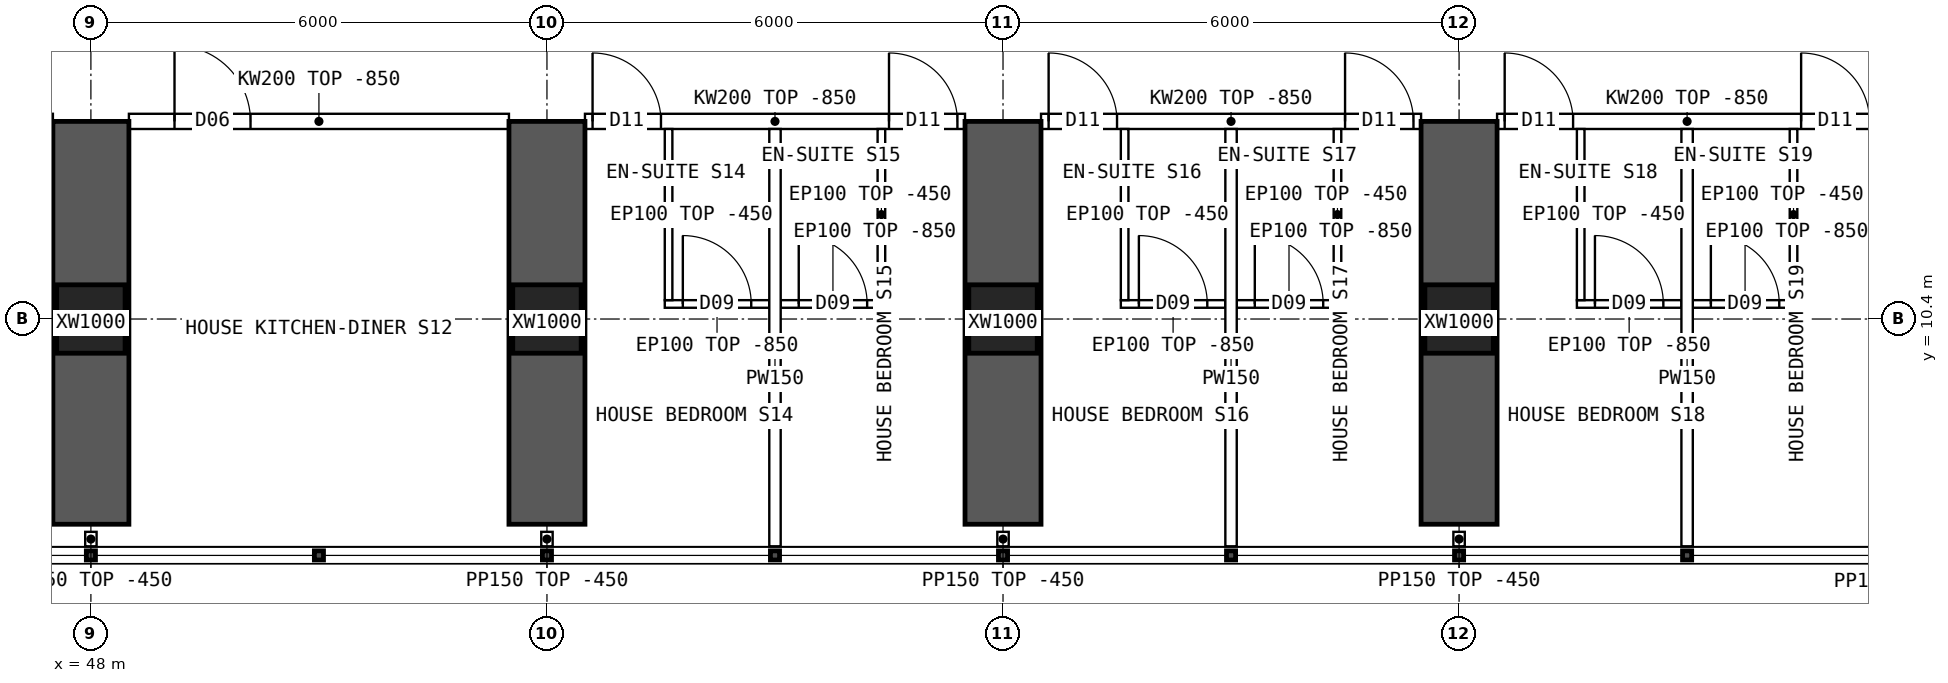
"""IFC4 building model, lengths in metres.
Left out: names, types, materials, properties, quantities, classifications, styles, units other than length and angle.
Written with IfcOpenShell. Run it as: python <this file> out.ifc"""

import sys

from ifc_helpers import new_model, si_unit, direction, frame, frame_2d, origin, origin_2d, place, context, subcontext, project, spatial, polyline, rectangle, hollow_rectangle, outline, extrude, element, fill, save


model = new_model("IFC4")
c1 = context("Model", 3, precision=1e-05, world=origin(), true_north=direction((0.0, 1.0)))
c2 = subcontext(c1, "Body", "Model", "MODEL_VIEW")
j1 = project(units=[si_unit("LENGTHUNIT", "METRE"), si_unit("PLANEANGLEUNIT", "RADIAN")], contexts=[c1])
p1 = place(None, origin())
s1 = spatial("IfcSite", under=j1, at=p1, CompositionType="ELEMENT")
p2 = place(p1, origin())
s2 = spatial("IfcBuilding", under=s1, at=p2, CompositionType="ELEMENT")
p3 = place(p2, frame((0.0, 0.0, 35.2)))
s3 = spatial("IfcBuildingStorey", under=s2, at=p3, CompositionType="ELEMENT", Elevation=35.2)
for number, where, z_axis, x_axis in (
    (1, (48.0, 10.4, 0.0), (0.0, 0.0, 1.0), (1.0, 0.0, 0.0)),
    (2, (54.0, 10.4, 0.0), (0.0, 0.0, 1.0), (1.0, 0.0, 0.0)),
    (3, (60.0, 10.4, 0.0), (0.0, 0.0, 1.0), (1.0, 0.0, 0.0)),
    (4, (66.0, 10.4, 0.0), (0.0, 0.0, 1.0), (1.0, 0.0, 0.0)),
):
    element("IfcColumn", number, at=place(p3, frame(where, z_axis=z_axis, x_axis=x_axis)), inside=s3, PredefinedType="COLUMN", context=c2, shape_type="SweptSolid", body=[
        extrude(hollow_rectangle(XDim=0.9, YDim=0.9, WallThickness=0.09, at=origin_2d()), origin(), (0.0, 0.0, 1.0), 3.75),
    ])
for number, where, z_axis, x_axis in (
    (5, (48.0, 7.7, 0.0), (0.0, 0.0, 1.0), (0.0, 1.0, 0.0)),
    (6, (54.0, 7.7, 0.0), (0.0, 0.0, 1.0), (0.0, 1.0, 0.0)),
    (7, (60.0, 7.7, 0.0), (0.0, 0.0, 1.0), (0.0, 1.0, 0.0)),
    (8, (66.0, 7.7, 0.0), (0.0, 0.0, 1.0), (0.0, 1.0, 0.0)),
):
    element("IfcWall", number, at=place(p3, frame(where, z_axis=z_axis, x_axis=x_axis)), inside=s3, PredefinedType="SHEAR", context=c2, shape_type="SweptSolid", body=[
        extrude(rectangle(XDim=5.3, YDim=1.0, at=frame_2d((2.65, 0.0))), origin(), (0.0, 0.0, 1.0), 3.75),
    ])
p4 = place(p3, frame((48.5, 13.0, 0.0), z_axis=(0.0, 0.0, 1.0), x_axis=(1.0, 0.0, 0.0)))
e9 = element("IfcWall", 9, at=p4, inside=s3, PredefinedType="SOLIDWALL", context=c2, shape_type="SweptSolid", body=[
    extrude(outline(polyline([(0.0, 0.0), (5.0, 0.0), (5.0, 2.9), (0.0, 2.9), (0.0, 0.0)])), frame((0.0, 0.1, 0.0), z_axis=(0.0, -1.0, 0.0), x_axis=(1.0, 0.0, 0.0)), (0.0, 0.0, 1.0), 0.2),
])
p5 = place(p4, frame((0.6, 0.0, 0.0)))
e10 = element("IfcOpeningElement", 10, at=p5, cuts=e9, PredefinedType="OPENING", context=c2, shape_type="SweptSolid", body=[
    extrude(rectangle(XDim=1.0, YDim=2.1, at=frame_2d((0.5, 1.05))), frame((0.0, 0.11, 0.0), z_axis=(0.0, -1.0, 0.0), x_axis=(1.0, 0.0, 0.0)), (0.0, 0.0, 1.0), 0.22),
])
p6 = place(p3, frame((54.5, 13.0, 0.0), z_axis=(0.0, 0.0, 1.0), x_axis=(1.0, 0.0, 0.0)))
e11 = element("IfcWall", 11, at=p6, inside=s3, PredefinedType="SOLIDWALL", context=c2, shape_type="SweptSolid", body=[
    extrude(outline(polyline([(0.0, 0.0), (5.0, 0.0), (5.0, 2.9), (0.0, 2.9), (0.0, 0.0)])), frame((0.0, 0.1, 0.0), z_axis=(0.0, -1.0, 0.0), x_axis=(1.0, 0.0, 0.0)), (0.0, 0.0, 1.0), 0.2),
])
p7 = place(p6, frame((0.1, 0.0, 0.0)))
e12 = element("IfcOpeningElement", 12, at=p7, cuts=e11, PredefinedType="OPENING", context=c2, shape_type="SweptSolid", body=[
    extrude(rectangle(XDim=0.9, YDim=2.1, at=frame_2d((0.45, 1.05))), frame((0.0, 0.11, 0.0), z_axis=(0.0, -1.0, 0.0), x_axis=(1.0, 0.0, 0.0)), (0.0, 0.0, 1.0), 0.22),
])
p8 = place(p6, frame((4.0, 0.0, 0.0)))
e13 = element("IfcOpeningElement", 13, at=p8, cuts=e11, PredefinedType="OPENING", context=c2, shape_type="SweptSolid", body=[
    extrude(rectangle(XDim=0.9, YDim=2.1, at=frame_2d((0.45, 1.05))), frame((0.0, 0.11, 0.0), z_axis=(0.0, -1.0, 0.0), x_axis=(1.0, 0.0, 0.0)), (0.0, 0.0, 1.0), 0.22),
])
p9 = place(p3, frame((60.5, 13.0, 0.0), z_axis=(0.0, 0.0, 1.0), x_axis=(1.0, 0.0, 0.0)))
e14 = element("IfcWall", 14, at=p9, inside=s3, PredefinedType="SOLIDWALL", context=c2, shape_type="SweptSolid", body=[
    extrude(outline(polyline([(0.0, 0.0), (5.0, 0.0), (5.0, 2.9), (0.0, 2.9), (0.0, 0.0)])), frame((0.0, 0.1, 0.0), z_axis=(0.0, -1.0, 0.0), x_axis=(1.0, 0.0, 0.0)), (0.0, 0.0, 1.0), 0.2),
])
p10 = place(p9, frame((0.1, 0.0, 0.0)))
e15 = element("IfcOpeningElement", 15, at=p10, cuts=e14, PredefinedType="OPENING", context=c2, shape_type="SweptSolid", body=[
    extrude(rectangle(XDim=0.9, YDim=2.1, at=frame_2d((0.45, 1.05))), frame((0.0, 0.11, 0.0), z_axis=(0.0, -1.0, 0.0), x_axis=(1.0, 0.0, 0.0)), (0.0, 0.0, 1.0), 0.22),
])
p11 = place(p9, frame((4.0, 0.0, 0.0)))
e16 = element("IfcOpeningElement", 16, at=p11, cuts=e14, PredefinedType="OPENING", context=c2, shape_type="SweptSolid", body=[
    extrude(rectangle(XDim=0.9, YDim=2.1, at=frame_2d((0.45, 1.05))), frame((0.0, 0.11, 0.0), z_axis=(0.0, -1.0, 0.0), x_axis=(1.0, 0.0, 0.0)), (0.0, 0.0, 1.0), 0.22),
])
p12 = place(p3, frame((66.5, 13.0, 0.0), z_axis=(0.0, 0.0, 1.0), x_axis=(1.0, 0.0, 0.0)))
e17 = element("IfcWall", 17, at=p12, inside=s3, PredefinedType="SOLIDWALL", context=c2, shape_type="SweptSolid", body=[
    extrude(outline(polyline([(0.0, 0.0), (5.0, 0.0), (5.0, 2.9), (0.0, 2.9), (0.0, 0.0)])), frame((0.0, 0.1, 0.0), z_axis=(0.0, -1.0, 0.0), x_axis=(1.0, 0.0, 0.0)), (0.0, 0.0, 1.0), 0.2),
])
p13 = place(p12, frame((0.1, 0.0, 0.0)))
e18 = element("IfcOpeningElement", 18, at=p13, cuts=e17, PredefinedType="OPENING", context=c2, shape_type="SweptSolid", body=[
    extrude(rectangle(XDim=0.9, YDim=2.1, at=frame_2d((0.45, 1.05))), frame((0.0, 0.11, 0.0), z_axis=(0.0, -1.0, 0.0), x_axis=(1.0, 0.0, 0.0)), (0.0, 0.0, 1.0), 0.22),
])
p14 = place(p12, frame((4.0, 0.0, 0.0)))
e19 = element("IfcOpeningElement", 19, at=p14, cuts=e17, PredefinedType="OPENING", context=c2, shape_type="SweptSolid", body=[
    extrude(rectangle(XDim=0.9, YDim=2.1, at=frame_2d((0.45, 1.05))), frame((0.0, 0.11, 0.0), z_axis=(0.0, -1.0, 0.0), x_axis=(1.0, 0.0, 0.0)), (0.0, 0.0, 1.0), 0.22),
])
p15 = place(p3, frame((57.0, 7.41, 0.0), z_axis=(0.0, 0.0, 1.0), x_axis=(0.0, 1.0, 0.0)))
e20 = element("IfcWall", 20, at=p15, inside=s3, PredefinedType="PARTITIONING", context=c2, shape_type="SweptSolid", body=[
    extrude(outline(polyline([(0.0, 0.0), (5.49, 0.0), (5.49, 2.9), (5.442, 2.9), (5.44, 3.3), (3.192, 3.3), (3.19, 2.9), (2.792, 2.9), (2.79, 3.3), (0.0, 3.3), (0.0, 0.0)])), frame((0.0, 0.075, 0.0), z_axis=(0.0, -1.0, 0.0), x_axis=(1.0, 0.0, 0.0)), (0.0, 0.0, 1.0), 0.15),
])
p16 = place(p3, frame((56.925, 10.598, 0.0), z_axis=(0.0, 0.0, 1.0), x_axis=(-1.0, 0.0, 0.0)))
e21 = element("IfcWall", 21, at=p16, inside=s3, PredefinedType="PARTITIONING", context=c2, shape_type="SweptSolid", body=[
    extrude(outline(polyline([(0.0, 0.0), (1.375, 0.0), (1.375, 2.9), (0.0, 2.9), (0.0, 0.0)])), frame((0.0, 0.05, 0.0), z_axis=(0.0, -1.0, 0.0), x_axis=(1.0, 0.0, 0.0)), (0.0, 0.0, 1.0), 0.1),
])
p17 = place(p16, frame((0.238, 0.0, 0.0)))
e22 = element("IfcOpeningElement", 22, at=p17, cuts=e21, PredefinedType="OPENING", context=c2, shape_type="SweptSolid", body=[
    extrude(rectangle(XDim=0.9, YDim=2.1, at=frame_2d((0.45, 1.05))), frame((0.0, 0.06, 0.0), z_axis=(0.0, -1.0, 0.0), x_axis=(1.0, 0.0, 0.0)), (0.0, 0.0, 1.0), 0.12),
])
p18 = place(p3, frame((55.6, 10.648, 0.0), z_axis=(0.0, 0.0, 1.0), x_axis=(0.0, 1.0, 0.0)))
e23 = element("IfcWall", 23, at=p18, inside=s3, PredefinedType="PARTITIONING", context=c2, shape_type="SweptSolid", body=[
    extrude(outline(polyline([(0.0, 0.0), (2.252, 0.0), (2.252, 2.9), (2.204, 2.9), (2.202, 3.3), (0.0, 3.3), (0.0, 0.0)])), frame((0.0, 0.05, 0.0), z_axis=(0.0, -1.0, 0.0), x_axis=(1.0, 0.0, 0.0)), (0.0, 0.0, 1.0), 0.1),
])
p19 = place(p3, frame((58.45, 10.598, 0.0), z_axis=(0.0, 0.0, 1.0), x_axis=(-1.0, 0.0, 0.0)))
e24 = element("IfcWall", 24, at=p19, inside=s3, PredefinedType="PARTITIONING", context=c2, shape_type="SweptSolid", body=[
    extrude(outline(polyline([(0.0, 0.0), (1.375, 0.0), (1.375, 2.9), (0.0, 2.9), (0.0, 0.0)])), frame((0.0, 0.05, 0.0), z_axis=(0.0, -1.0, 0.0), x_axis=(1.0, 0.0, 0.0)), (0.0, 0.0, 1.0), 0.1),
])
p20 = place(p19, frame((0.238, 0.0, 0.0)))
e25 = element("IfcOpeningElement", 25, at=p20, cuts=e24, PredefinedType="OPENING", context=c2, shape_type="SweptSolid", body=[
    extrude(rectangle(XDim=0.9, YDim=2.1, at=frame_2d((0.45, 1.05))), frame((0.0, 0.06, 0.0), z_axis=(0.0, -1.0, 0.0), x_axis=(1.0, 0.0, 0.0)), (0.0, 0.0, 1.0), 0.12),
])
p21 = place(p3, frame((58.4, 10.648, 0.0), z_axis=(0.0, 0.0, 1.0), x_axis=(0.0, 1.0, 0.0)))
e26 = element("IfcWall", 26, at=p21, inside=s3, PredefinedType="PARTITIONING", context=c2, shape_type="SweptSolid", body=[
    extrude(outline(polyline([(0.0, 0.0), (2.252, 0.0), (2.252, 2.9), (2.204, 2.9), (2.202, 3.3), (0.0, 3.3), (0.0, 0.0)])), frame((0.0, 0.05, 0.0), z_axis=(0.0, -1.0, 0.0), x_axis=(1.0, 0.0, 0.0)), (0.0, 0.0, 1.0), 0.1),
])
p22 = place(p3, frame((63.0, 7.41, 0.0), z_axis=(0.0, 0.0, 1.0), x_axis=(0.0, 1.0, 0.0)))
e27 = element("IfcWall", 27, at=p22, inside=s3, PredefinedType="PARTITIONING", context=c2, shape_type="SweptSolid", body=[
    extrude(outline(polyline([(0.0, 0.0), (5.49, 0.0), (5.49, 2.9), (5.442, 2.9), (5.44, 3.3), (3.192, 3.3), (3.19, 2.9), (2.792, 2.9), (2.79, 3.3), (0.0, 3.3), (0.0, 0.0)])), frame((0.0, 0.075, 0.0), z_axis=(0.0, -1.0, 0.0), x_axis=(1.0, 0.0, 0.0)), (0.0, 0.0, 1.0), 0.15),
])
p23 = place(p3, frame((62.925, 10.598, 0.0), z_axis=(0.0, 0.0, 1.0), x_axis=(-1.0, 0.0, 0.0)))
e28 = element("IfcWall", 28, at=p23, inside=s3, PredefinedType="PARTITIONING", context=c2, shape_type="SweptSolid", body=[
    extrude(outline(polyline([(0.0, 0.0), (1.375, 0.0), (1.375, 2.9), (0.0, 2.9), (0.0, 0.0)])), frame((0.0, 0.05, 0.0), z_axis=(0.0, -1.0, 0.0), x_axis=(1.0, 0.0, 0.0)), (0.0, 0.0, 1.0), 0.1),
])
p24 = place(p23, frame((0.238, 0.0, 0.0)))
e29 = element("IfcOpeningElement", 29, at=p24, cuts=e28, PredefinedType="OPENING", context=c2, shape_type="SweptSolid", body=[
    extrude(rectangle(XDim=0.9, YDim=2.1, at=frame_2d((0.45, 1.05))), frame((0.0, 0.06, 0.0), z_axis=(0.0, -1.0, 0.0), x_axis=(1.0, 0.0, 0.0)), (0.0, 0.0, 1.0), 0.12),
])
p25 = place(p3, frame((61.6, 10.648, 0.0), z_axis=(0.0, 0.0, 1.0), x_axis=(0.0, 1.0, 0.0)))
e30 = element("IfcWall", 30, at=p25, inside=s3, PredefinedType="PARTITIONING", context=c2, shape_type="SweptSolid", body=[
    extrude(outline(polyline([(0.0, 0.0), (2.252, 0.0), (2.252, 2.9), (2.204, 2.9), (2.202, 3.3), (0.0, 3.3), (0.0, 0.0)])), frame((0.0, 0.05, 0.0), z_axis=(0.0, -1.0, 0.0), x_axis=(1.0, 0.0, 0.0)), (0.0, 0.0, 1.0), 0.1),
])
p26 = place(p3, frame((64.45, 10.598, 0.0), z_axis=(0.0, 0.0, 1.0), x_axis=(-1.0, 0.0, 0.0)))
e31 = element("IfcWall", 31, at=p26, inside=s3, PredefinedType="PARTITIONING", context=c2, shape_type="SweptSolid", body=[
    extrude(outline(polyline([(0.0, 0.0), (1.375, 0.0), (1.375, 2.9), (0.0, 2.9), (0.0, 0.0)])), frame((0.0, 0.05, 0.0), z_axis=(0.0, -1.0, 0.0), x_axis=(1.0, 0.0, 0.0)), (0.0, 0.0, 1.0), 0.1),
])
p27 = place(p26, frame((0.238, 0.0, 0.0)))
e32 = element("IfcOpeningElement", 32, at=p27, cuts=e31, PredefinedType="OPENING", context=c2, shape_type="SweptSolid", body=[
    extrude(rectangle(XDim=0.9, YDim=2.1, at=frame_2d((0.45, 1.05))), frame((0.0, 0.06, 0.0), z_axis=(0.0, -1.0, 0.0), x_axis=(1.0, 0.0, 0.0)), (0.0, 0.0, 1.0), 0.12),
])
p28 = place(p3, frame((64.4, 10.648, 0.0), z_axis=(0.0, 0.0, 1.0), x_axis=(0.0, 1.0, 0.0)))
e33 = element("IfcWall", 33, at=p28, inside=s3, PredefinedType="PARTITIONING", context=c2, shape_type="SweptSolid", body=[
    extrude(outline(polyline([(0.0, 0.0), (2.252, 0.0), (2.252, 2.9), (2.204, 2.9), (2.202, 3.3), (0.0, 3.3), (0.0, 0.0)])), frame((0.0, 0.05, 0.0), z_axis=(0.0, -1.0, 0.0), x_axis=(1.0, 0.0, 0.0)), (0.0, 0.0, 1.0), 0.1),
])
p29 = place(p3, frame((69.0, 7.41, 0.0), z_axis=(0.0, 0.0, 1.0), x_axis=(0.0, 1.0, 0.0)))
e34 = element("IfcWall", 34, at=p29, inside=s3, PredefinedType="PARTITIONING", context=c2, shape_type="SweptSolid", body=[
    extrude(outline(polyline([(0.0, 0.0), (5.49, 0.0), (5.49, 2.9), (5.442, 2.9), (5.44, 3.3), (3.192, 3.3), (3.19, 2.9), (2.792, 2.9), (2.79, 3.3), (0.0, 3.3), (0.0, 0.0)])), frame((0.0, 0.075, 0.0), z_axis=(0.0, -1.0, 0.0), x_axis=(1.0, 0.0, 0.0)), (0.0, 0.0, 1.0), 0.15),
])
p30 = place(p3, frame((68.925, 10.598, 0.0), z_axis=(0.0, 0.0, 1.0), x_axis=(-1.0, 0.0, 0.0)))
e35 = element("IfcWall", 35, at=p30, inside=s3, PredefinedType="PARTITIONING", context=c2, shape_type="SweptSolid", body=[
    extrude(outline(polyline([(0.0, 0.0), (1.375, 0.0), (1.375, 2.9), (0.0, 2.9), (0.0, 0.0)])), frame((0.0, 0.05, 0.0), z_axis=(0.0, -1.0, 0.0), x_axis=(1.0, 0.0, 0.0)), (0.0, 0.0, 1.0), 0.1),
])
p31 = place(p30, frame((0.238, 0.0, 0.0)))
e36 = element("IfcOpeningElement", 36, at=p31, cuts=e35, PredefinedType="OPENING", context=c2, shape_type="SweptSolid", body=[
    extrude(rectangle(XDim=0.9, YDim=2.1, at=frame_2d((0.45, 1.05))), frame((0.0, 0.06, 0.0), z_axis=(0.0, -1.0, 0.0), x_axis=(1.0, 0.0, 0.0)), (0.0, 0.0, 1.0), 0.12),
])
p32 = place(p3, frame((67.6, 10.648, 0.0), z_axis=(0.0, 0.0, 1.0), x_axis=(0.0, 1.0, 0.0)))
e37 = element("IfcWall", 37, at=p32, inside=s3, PredefinedType="PARTITIONING", context=c2, shape_type="SweptSolid", body=[
    extrude(outline(polyline([(0.0, 0.0), (2.252, 0.0), (2.252, 2.9), (2.204, 2.9), (2.202, 3.3), (0.0, 3.3), (0.0, 0.0)])), frame((0.0, 0.05, 0.0), z_axis=(0.0, -1.0, 0.0), x_axis=(1.0, 0.0, 0.0)), (0.0, 0.0, 1.0), 0.1),
])
p33 = place(p3, frame((70.45, 10.598, 0.0), z_axis=(0.0, 0.0, 1.0), x_axis=(-1.0, 0.0, 0.0)))
e38 = element("IfcWall", 38, at=p33, inside=s3, PredefinedType="PARTITIONING", context=c2, shape_type="SweptSolid", body=[
    extrude(outline(polyline([(0.0, 0.0), (1.375, 0.0), (1.375, 2.9), (0.0, 2.9), (0.0, 0.0)])), frame((0.0, 0.05, 0.0), z_axis=(0.0, -1.0, 0.0), x_axis=(1.0, 0.0, 0.0)), (0.0, 0.0, 1.0), 0.1),
])
p34 = place(p33, frame((0.238, 0.0, 0.0)))
e39 = element("IfcOpeningElement", 39, at=p34, cuts=e38, PredefinedType="OPENING", context=c2, shape_type="SweptSolid", body=[
    extrude(rectangle(XDim=0.9, YDim=2.1, at=frame_2d((0.45, 1.05))), frame((0.0, 0.06, 0.0), z_axis=(0.0, -1.0, 0.0), x_axis=(1.0, 0.0, 0.0)), (0.0, 0.0, 1.0), 0.12),
])
p35 = place(p3, frame((70.4, 10.648, 0.0), z_axis=(0.0, 0.0, 1.0), x_axis=(0.0, 1.0, 0.0)))
e40 = element("IfcWall", 40, at=p35, inside=s3, PredefinedType="PARTITIONING", context=c2, shape_type="SweptSolid", body=[
    extrude(outline(polyline([(0.0, 0.0), (2.252, 0.0), (2.252, 2.9), (2.204, 2.9), (2.202, 3.3), (0.0, 3.3), (0.0, 0.0)])), frame((0.0, 0.05, 0.0), z_axis=(0.0, -1.0, 0.0), x_axis=(1.0, 0.0, 0.0)), (0.0, 0.0, 1.0), 0.1),
])
for number, where, z_axis, x_axis in (
    (41, (48.0, 7.6, 0.0), (0.0, 0.0, 1.0), (0.0, -1.0, 0.0)),
    (42, (54.0, 7.6, 0.0), (0.0, 0.0, 1.0), (0.0, -1.0, 0.0)),
    (43, (60.0, 7.6, 0.0), (0.0, 0.0, 1.0), (0.0, -1.0, 0.0)),
    (44, (66.0, 7.6, 0.0), (0.0, 0.0, 1.0), (0.0, -1.0, 0.0)),
):
    element("IfcWall", number, at=place(p3, frame(where, z_axis=z_axis, x_axis=x_axis)), inside=s3, PredefinedType="PARTITIONING", context=c2, shape_type="SweptSolid", body=[
        extrude(rectangle(XDim=0.19, YDim=0.15, at=frame_2d((0.095, 0.0))), origin(), (0.0, 0.0, 1.0), 3.3),
    ])
p36 = place(p5, origin())
e45 = element("IfcDoor", 45, at=p36, inside=s3, OperationType="SINGLE_SWING_LEFT", PredefinedType="DOOR", context=c2, shape_type="SweptSolid", body=[
    extrude(rectangle(XDim=1.0, YDim=2.1, at=frame_2d((0.5, 1.05))), frame((0.0, 0.025, 0.0), z_axis=(0.0, -1.0, 0.0), x_axis=(1.0, 0.0, 0.0)), (0.0, 0.0, 1.0), 0.05),
])
fill(e10, e45)
p37 = place(p17, origin())
e46 = element("IfcDoor", 46, at=p37, inside=s3, OperationType="SINGLE_SWING_RIGHT", PredefinedType="DOOR", context=c2, shape_type="SweptSolid", body=[
    extrude(rectangle(XDim=0.9, YDim=2.1, at=frame_2d((0.45, 1.05))), frame((0.0, 0.025, 0.0), z_axis=(0.0, -1.0, 0.0), x_axis=(1.0, 0.0, 0.0)), (0.0, 0.0, 1.0), 0.05),
])
fill(e22, e46)
p38 = place(p7, origin())
e47 = element("IfcDoor", 47, at=p38, inside=s3, OperationType="SINGLE_SWING_LEFT", PredefinedType="DOOR", context=c2, shape_type="SweptSolid", body=[
    extrude(rectangle(XDim=0.9, YDim=2.1, at=frame_2d((0.45, 1.05))), frame((0.0, 0.025, 0.0), z_axis=(0.0, -1.0, 0.0), x_axis=(1.0, 0.0, 0.0)), (0.0, 0.0, 1.0), 0.05),
])
fill(e12, e47)
p39 = place(p20, origin())
e48 = element("IfcDoor", 48, at=p39, inside=s3, OperationType="SINGLE_SWING_RIGHT", PredefinedType="DOOR", context=c2, shape_type="SweptSolid", body=[
    extrude(rectangle(XDim=0.9, YDim=2.1, at=frame_2d((0.45, 1.05))), frame((0.0, 0.025, 0.0), z_axis=(0.0, -1.0, 0.0), x_axis=(1.0, 0.0, 0.0)), (0.0, 0.0, 1.0), 0.05),
])
fill(e25, e48)
p40 = place(p8, origin())
e49 = element("IfcDoor", 49, at=p40, inside=s3, OperationType="SINGLE_SWING_LEFT", PredefinedType="DOOR", context=c2, shape_type="SweptSolid", body=[
    extrude(rectangle(XDim=0.9, YDim=2.1, at=frame_2d((0.45, 1.05))), frame((0.0, 0.025, 0.0), z_axis=(0.0, -1.0, 0.0), x_axis=(1.0, 0.0, 0.0)), (0.0, 0.0, 1.0), 0.05),
])
fill(e13, e49)
p41 = place(p24, origin())
e50 = element("IfcDoor", 50, at=p41, inside=s3, OperationType="SINGLE_SWING_RIGHT", PredefinedType="DOOR", context=c2, shape_type="SweptSolid", body=[
    extrude(rectangle(XDim=0.9, YDim=2.1, at=frame_2d((0.45, 1.05))), frame((0.0, 0.025, 0.0), z_axis=(0.0, -1.0, 0.0), x_axis=(1.0, 0.0, 0.0)), (0.0, 0.0, 1.0), 0.05),
])
fill(e29, e50)
p42 = place(p10, origin())
e51 = element("IfcDoor", 51, at=p42, inside=s3, OperationType="SINGLE_SWING_LEFT", PredefinedType="DOOR", context=c2, shape_type="SweptSolid", body=[
    extrude(rectangle(XDim=0.9, YDim=2.1, at=frame_2d((0.45, 1.05))), frame((0.0, 0.025, 0.0), z_axis=(0.0, -1.0, 0.0), x_axis=(1.0, 0.0, 0.0)), (0.0, 0.0, 1.0), 0.05),
])
fill(e15, e51)
p43 = place(p27, origin())
e52 = element("IfcDoor", 52, at=p43, inside=s3, OperationType="SINGLE_SWING_RIGHT", PredefinedType="DOOR", context=c2, shape_type="SweptSolid", body=[
    extrude(rectangle(XDim=0.9, YDim=2.1, at=frame_2d((0.45, 1.05))), frame((0.0, 0.025, 0.0), z_axis=(0.0, -1.0, 0.0), x_axis=(1.0, 0.0, 0.0)), (0.0, 0.0, 1.0), 0.05),
])
fill(e32, e52)
p44 = place(p11, origin())
e53 = element("IfcDoor", 53, at=p44, inside=s3, OperationType="SINGLE_SWING_LEFT", PredefinedType="DOOR", context=c2, shape_type="SweptSolid", body=[
    extrude(rectangle(XDim=0.9, YDim=2.1, at=frame_2d((0.45, 1.05))), frame((0.0, 0.025, 0.0), z_axis=(0.0, -1.0, 0.0), x_axis=(1.0, 0.0, 0.0)), (0.0, 0.0, 1.0), 0.05),
])
fill(e16, e53)
p45 = place(p31, origin())
e54 = element("IfcDoor", 54, at=p45, inside=s3, OperationType="SINGLE_SWING_RIGHT", PredefinedType="DOOR", context=c2, shape_type="SweptSolid", body=[
    extrude(rectangle(XDim=0.9, YDim=2.1, at=frame_2d((0.45, 1.05))), frame((0.0, 0.025, 0.0), z_axis=(0.0, -1.0, 0.0), x_axis=(1.0, 0.0, 0.0)), (0.0, 0.0, 1.0), 0.05),
])
fill(e36, e54)
p46 = place(p13, origin())
e55 = element("IfcDoor", 55, at=p46, inside=s3, OperationType="SINGLE_SWING_LEFT", PredefinedType="DOOR", context=c2, shape_type="SweptSolid", body=[
    extrude(rectangle(XDim=0.9, YDim=2.1, at=frame_2d((0.45, 1.05))), frame((0.0, 0.025, 0.0), z_axis=(0.0, -1.0, 0.0), x_axis=(1.0, 0.0, 0.0)), (0.0, 0.0, 1.0), 0.05),
])
fill(e18, e55)
p47 = place(p34, origin())
e56 = element("IfcDoor", 56, at=p47, inside=s3, OperationType="SINGLE_SWING_RIGHT", PredefinedType="DOOR", context=c2, shape_type="SweptSolid", body=[
    extrude(rectangle(XDim=0.9, YDim=2.1, at=frame_2d((0.45, 1.05))), frame((0.0, 0.025, 0.0), z_axis=(0.0, -1.0, 0.0), x_axis=(1.0, 0.0, 0.0)), (0.0, 0.0, 1.0), 0.05),
])
fill(e39, e56)
p48 = place(p14, origin())
e57 = element("IfcDoor", 57, at=p48, inside=s3, OperationType="SINGLE_SWING_LEFT", PredefinedType="DOOR", context=c2, shape_type="SweptSolid", body=[
    extrude(rectangle(XDim=0.9, YDim=2.1, at=frame_2d((0.45, 1.05))), frame((0.0, 0.025, 0.0), z_axis=(0.0, -1.0, 0.0), x_axis=(1.0, 0.0, 0.0)), (0.0, 0.0, 1.0), 0.05),
])
fill(e19, e57)
save(model, sys.argv[1])
